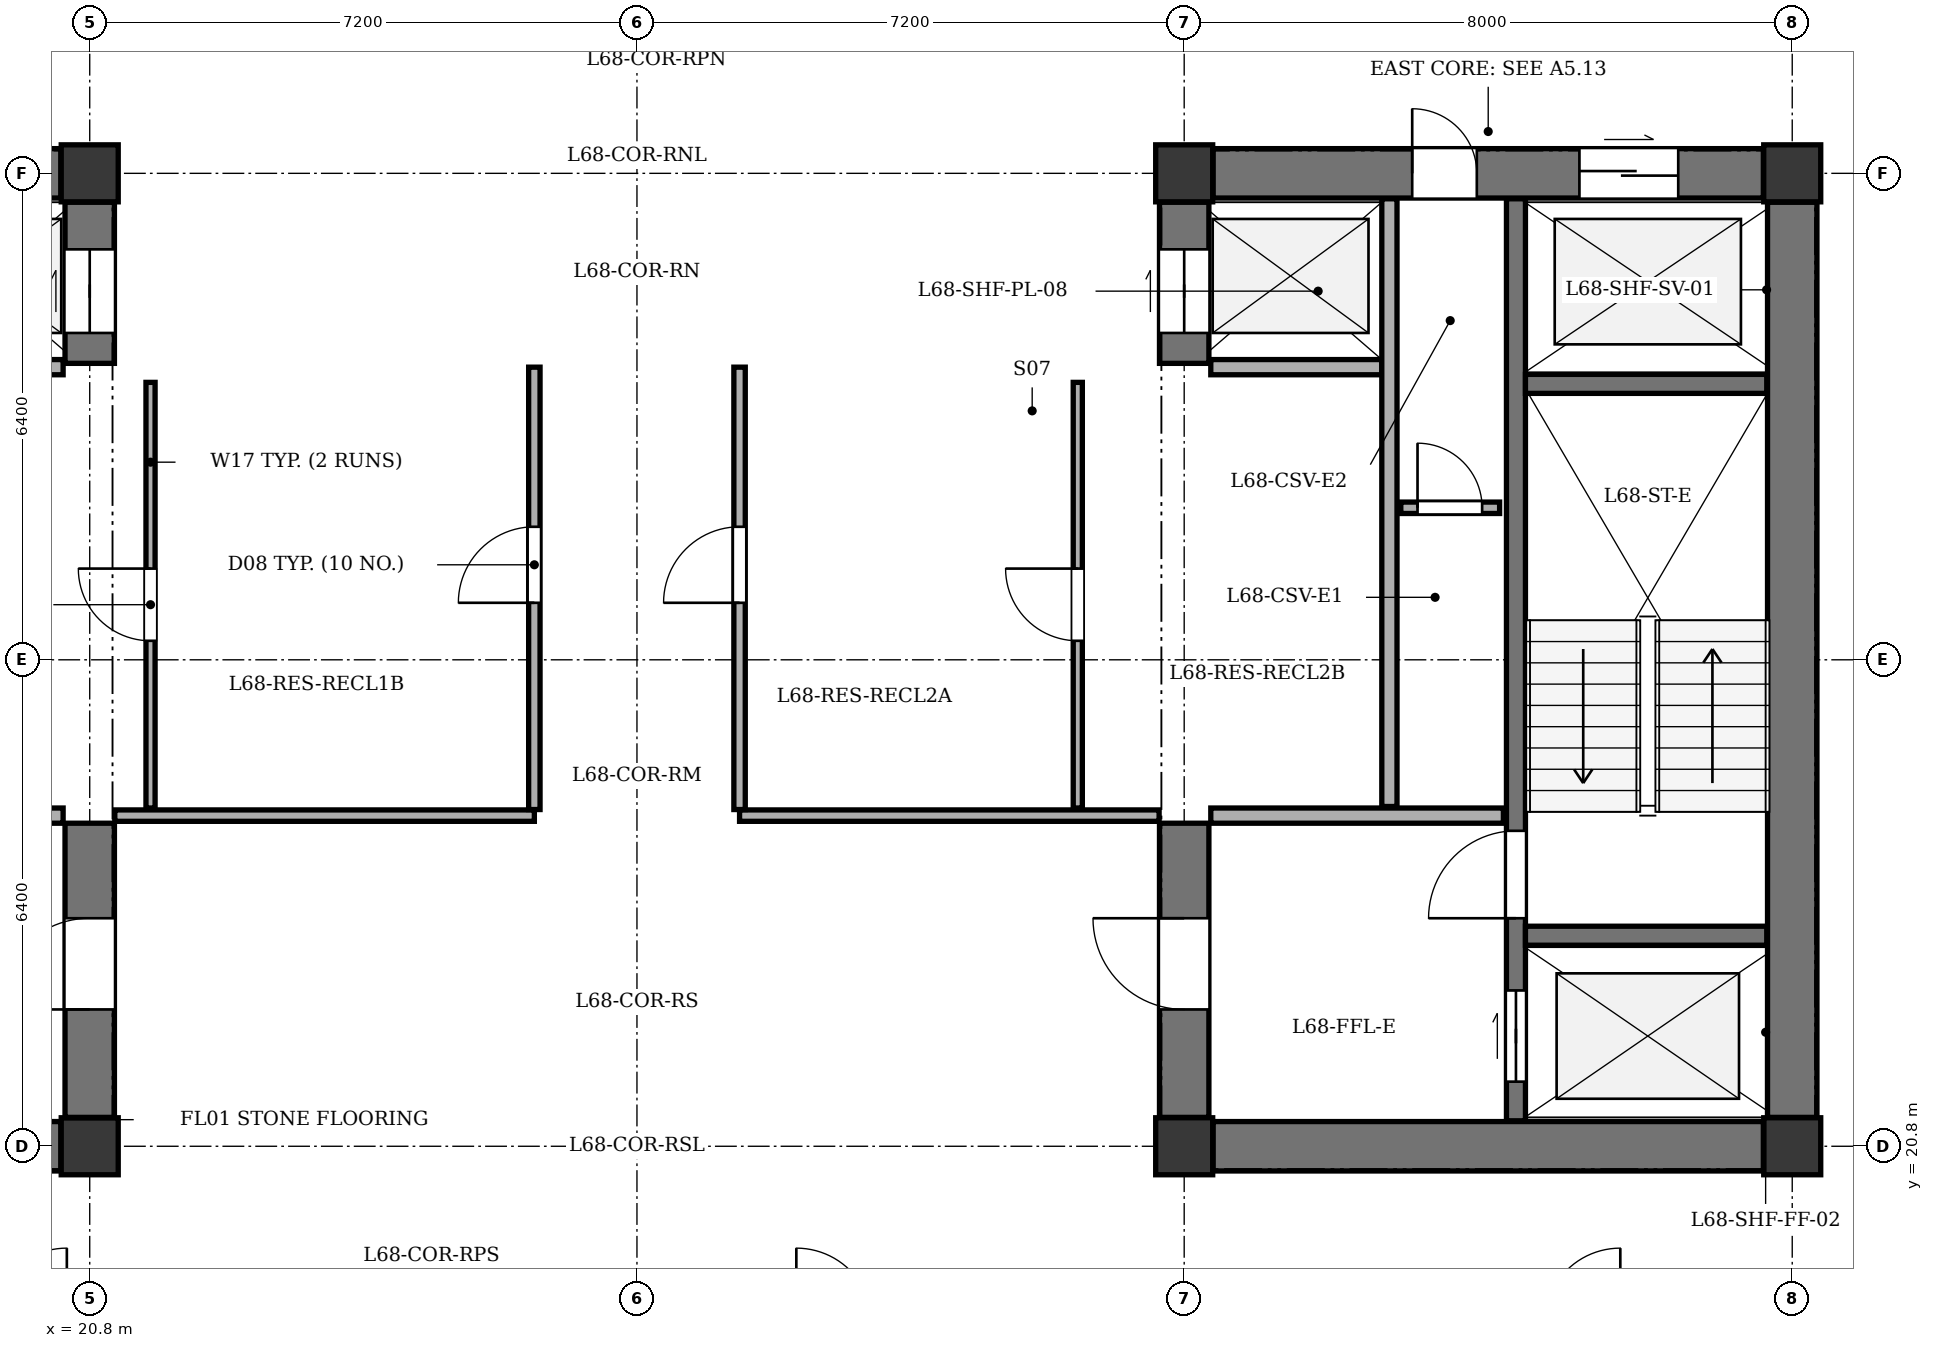
"""IFC4 building model, lengths in metres.
Left out: names, types, materials, properties, quantities, classifications, styles, units other than length and angle.
Written with IfcOpenShell. Run it as: python <this file> out.ifc"""

import sys

from ifc_helpers import new_model, si_unit, direction, frame, frame_2d, origin, origin_2d, place, context, subcontext, project, spatial, rectangle, extrude, element, fill, save


model = new_model("IFC4")
c1 = context("Model", 3, precision=1e-05, world=origin(), true_north=direction((0.0, 1.0)))
c2 = subcontext(c1, "Body", "Model", "MODEL_VIEW")
j1 = project(units=[si_unit("LENGTHUNIT", "METRE"), si_unit("PLANEANGLEUNIT", "RADIAN")], contexts=[c1])
p1 = place(None, origin())
s1 = spatial("IfcSite", under=j1, at=p1, CompositionType="ELEMENT")
p2 = place(p1, origin())
s2 = spatial("IfcBuilding", under=s1, at=p2, CompositionType="ELEMENT")
p3 = place(p2, frame((0.0, 0.0, 258.5)))
s3 = spatial("IfcBuildingStorey", under=s2, at=p3, CompositionType="ELEMENT", Elevation=258.5)
for number, where, z_axis, x_axis in (
    (1, (20.8, 20.8, 0.0), (0.0, 0.0, 1.0), (1.0, 0.0, 0.0)),
    (2, (20.8, 33.6, 0.0), (0.0, 0.0, 1.0), (1.0, 0.0, 0.0)),
    (3, (35.2, 20.8, 0.0), (0.0, 0.0, 1.0), (1.0, 0.0, 0.0)),
    (4, (43.2, 20.8, 0.0), (0.0, 0.0, 1.0), (1.0, 0.0, 0.0)),
    (5, (35.2, 33.6, 0.0), (0.0, 0.0, 1.0), (1.0, 0.0, 0.0)),
    (6, (43.2, 33.6, 0.0), (0.0, 0.0, 1.0), (1.0, 0.0, 0.0)),
):
    element("IfcColumn", number, at=place(p3, frame(where, z_axis=z_axis, x_axis=x_axis)), inside=s3, PredefinedType="COLUMN", context=c2, shape_type="SweptSolid", body=[
        extrude(rectangle(XDim=0.75, YDim=0.75, at=origin_2d()), origin(), (0.0, 0.0, 1.0), 3.4),
    ])
p4 = place(p3, frame((13.18, 20.8, 0.0), z_axis=(0.0, 0.0, 1.0), x_axis=(1.0, 0.0, 0.0)))
e7 = element("IfcWall", 7, at=p4, inside=s3, PredefinedType="SHEAR", context=c2, shape_type="SweptSolid", body=[
    extrude(rectangle(XDim=7.24, YDim=0.65, at=frame_2d((3.62, 0.0))), origin(), (0.0, 0.0, 1.0), 3.1),
])
p5 = place(p3, frame((13.18, 33.6, 0.0), z_axis=(0.0, 0.0, 1.0), x_axis=(1.0, 0.0, 0.0)))
e8 = element("IfcWall", 8, at=p5, inside=s3, PredefinedType="SHEAR", context=c2, shape_type="SweptSolid", body=[
    extrude(rectangle(XDim=7.24, YDim=0.65, at=frame_2d((3.62, 0.0))), origin(), (0.0, 0.0, 1.0), 3.1),
])
p6 = place(p5, frame((2.19, 0.0, 0.0)))
e9 = element("IfcOpeningElement", 9, at=p6, cuts=e8, PredefinedType="OPENING", context=c2, shape_type="SweptSolid", body=[
    extrude(rectangle(XDim=0.85, YDim=2.02, at=frame_2d((0.425, 1.01))), frame((0.0, 0.335, 0.0), z_axis=(0.0, -1.0, 0.0), x_axis=(1.0, 0.0, 0.0)), (0.0, 0.0, 1.0), 0.67),
])
p7 = place(p3, frame((20.8, 21.18, 0.0), z_axis=(0.0, 0.0, 1.0), x_axis=(0.0, 1.0, 0.0)))
e10 = element("IfcWall", 10, at=p7, inside=s3, PredefinedType="SHEAR", context=c2, shape_type="SweptSolid", body=[
    extrude(rectangle(XDim=3.87, YDim=0.65, at=frame_2d((1.935, 0.0))), origin(), (0.0, 0.0, 1.0), 3.1),
])
p8 = place(p7, frame((1.42, 0.0, 0.0)))
e11 = element("IfcOpeningElement", 11, at=p8, cuts=e10, PredefinedType="OPENING", context=c2, shape_type="SweptSolid", body=[
    extrude(rectangle(XDim=1.2, YDim=2.15, at=frame_2d((0.6, 1.075))), frame((0.0, 0.335, 0.0), z_axis=(0.0, -1.0, 0.0), x_axis=(1.0, 0.0, 0.0)), (0.0, 0.0, 1.0), 0.67),
])
p9 = place(p3, frame((20.8, 31.1, 0.0), z_axis=(0.0, 0.0, 1.0), x_axis=(0.0, 1.0, 0.0)))
e12 = element("IfcWall", 12, at=p9, inside=s3, PredefinedType="SHEAR", context=c2, shape_type="SweptSolid", body=[
    extrude(rectangle(XDim=2.12, YDim=0.65, at=frame_2d((1.06, 0.0))), origin(), (0.0, 0.0, 1.0), 3.1),
])
p10 = place(p9, frame((0.4, 0.0, 0.0)))
e13 = element("IfcOpeningElement", 13, at=p10, cuts=e12, PredefinedType="OPENING", context=c2, shape_type="SweptSolid", body=[
    extrude(rectangle(XDim=1.1, YDim=2.1, at=frame_2d((0.55, 1.05))), frame((0.0, 0.335, 0.0), z_axis=(0.0, -1.0, 0.0), x_axis=(1.0, 0.0, 0.0)), (0.0, 0.0, 1.0), 0.67),
])
for number, where, z_axis, x_axis in (
    (14, (16.6, 25.15, 0.0), (0.0, 0.0, 1.0), (1.0, 0.0, 0.0)),
    (15, (16.6, 31.05, 0.0), (0.0, 0.0, 1.0), (1.0, 0.0, 0.0)),
):
    element("IfcWall", number, at=place(p3, frame(where, z_axis=z_axis, x_axis=x_axis)), inside=s3, PredefinedType="SOLIDWALL", context=c2, shape_type="SweptSolid", body=[
        extrude(rectangle(XDim=3.85, YDim=0.2, at=frame_2d((1.925, 0.0))), origin(), (0.0, 0.0, 1.0), 3.1),
    ])
p11 = place(p3, frame((43.2, 21.18, 0.0), z_axis=(0.0, 0.0, 1.0), x_axis=(0.0, 1.0, 0.0)))
e16 = element("IfcWall", 16, at=p11, inside=s3, PredefinedType="SHEAR", context=c2, shape_type="SweptSolid", body=[
    extrude(rectangle(XDim=12.04, YDim=0.65, at=frame_2d((6.02, 0.0))), origin(), (0.0, 0.0, 1.0), 3.1),
])
p12 = place(p3, frame((35.58, 20.8, 0.0), z_axis=(0.0, 0.0, 1.0), x_axis=(1.0, 0.0, 0.0)))
e17 = element("IfcWall", 17, at=p12, inside=s3, PredefinedType="SHEAR", context=c2, shape_type="SweptSolid", body=[
    extrude(rectangle(XDim=7.24, YDim=0.65, at=frame_2d((3.62, 0.0))), origin(), (0.0, 0.0, 1.0), 3.1),
])
p13 = place(p3, frame((35.58, 33.6, 0.0), z_axis=(0.0, 0.0, 1.0), x_axis=(1.0, 0.0, 0.0)))
e18 = element("IfcWall", 18, at=p13, inside=s3, PredefinedType="SHEAR", context=c2, shape_type="SweptSolid", body=[
    extrude(rectangle(XDim=7.24, YDim=0.65, at=frame_2d((3.62, 0.0))), origin(), (0.0, 0.0, 1.0), 3.1),
])
p14 = place(p13, frame((4.82, 0.0, 0.0)))
e19 = element("IfcOpeningElement", 19, at=p14, cuts=e18, PredefinedType="OPENING", context=c2, shape_type="SweptSolid", body=[
    extrude(rectangle(XDim=1.3, YDim=2.15, at=frame_2d((0.65, 1.075))), frame((0.0, 0.335, 0.0), z_axis=(0.0, -1.0, 0.0), x_axis=(1.0, 0.0, 0.0)), (0.0, 0.0, 1.0), 0.67),
])
p15 = place(p13, frame((2.62, 0.0, 0.0)))
e20 = element("IfcOpeningElement", 20, at=p15, cuts=e18, PredefinedType="OPENING", context=c2, shape_type="SweptSolid", body=[
    extrude(rectangle(XDim=0.85, YDim=2.02, at=frame_2d((0.425, 1.01))), frame((0.0, 0.335, 0.0), z_axis=(0.0, -1.0, 0.0), x_axis=(1.0, 0.0, 0.0)), (0.0, 0.0, 1.0), 0.67),
])
p16 = place(p3, frame((35.2, 21.18, 0.0), z_axis=(0.0, 0.0, 1.0), x_axis=(0.0, 1.0, 0.0)))
e21 = element("IfcWall", 21, at=p16, inside=s3, PredefinedType="SHEAR", context=c2, shape_type="SweptSolid", body=[
    extrude(rectangle(XDim=3.87, YDim=0.65, at=frame_2d((1.935, 0.0))), origin(), (0.0, 0.0, 1.0), 3.1),
])
p17 = place(p16, frame((1.42, 0.0, 0.0)))
e22 = element("IfcOpeningElement", 22, at=p17, cuts=e21, PredefinedType="OPENING", context=c2, shape_type="SweptSolid", body=[
    extrude(rectangle(XDim=1.2, YDim=2.15, at=frame_2d((0.6, 1.075))), frame((0.0, 0.335, 0.0), z_axis=(0.0, -1.0, 0.0), x_axis=(1.0, 0.0, 0.0)), (0.0, 0.0, 1.0), 0.67),
])
p18 = place(p3, frame((35.2, 31.1, 0.0), z_axis=(0.0, 0.0, 1.0), x_axis=(0.0, 1.0, 0.0)))
e23 = element("IfcWall", 23, at=p18, inside=s3, PredefinedType="SHEAR", context=c2, shape_type="SweptSolid", body=[
    extrude(rectangle(XDim=2.12, YDim=0.65, at=frame_2d((1.06, 0.0))), origin(), (0.0, 0.0, 1.0), 3.1),
])
p19 = place(p18, frame((0.4, 0.0, 0.0)))
e24 = element("IfcOpeningElement", 24, at=p19, cuts=e23, PredefinedType="OPENING", context=c2, shape_type="SweptSolid", body=[
    extrude(rectangle(XDim=1.1, YDim=2.1, at=frame_2d((0.55, 1.05))), frame((0.0, 0.335, 0.0), z_axis=(0.0, -1.0, 0.0), x_axis=(1.0, 0.0, 0.0)), (0.0, 0.0, 1.0), 0.67),
])
p20 = place(p3, frame((39.565, 21.135, 0.0), z_axis=(0.0, 0.0, 1.0), x_axis=(0.0, 1.0, 0.0)))
e25 = element("IfcWall", 25, at=p20, inside=s3, PredefinedType="SHEAR", context=c2, shape_type="SweptSolid", body=[
    extrude(rectangle(XDim=12.13, YDim=0.25, at=frame_2d((6.065, 0.0))), origin(), (0.0, 0.0, 1.0), 3.1),
])
p21 = place(p20, frame((0.515, 0.0, 0.0)))
e26 = element("IfcOpeningElement", 26, at=p21, cuts=e25, PredefinedType="OPENING", context=c2, shape_type="SweptSolid", body=[
    extrude(rectangle(XDim=1.2, YDim=2.15, at=frame_2d((0.6, 1.075))), frame((0.0, 0.135, 0.0), z_axis=(0.0, -1.0, 0.0), x_axis=(1.0, 0.0, 0.0)), (0.0, 0.0, 1.0), 0.27),
])
p22 = place(p20, frame((2.665, 0.0, 0.0)))
e27 = element("IfcOpeningElement", 27, at=p22, cuts=e25, PredefinedType="OPENING", context=c2, shape_type="SweptSolid", body=[
    extrude(rectangle(XDim=1.15, YDim=2.15, at=frame_2d((0.575, 1.075))), frame((0.0, 0.135, 0.0), z_axis=(0.0, -1.0, 0.0), x_axis=(1.0, 0.0, 0.0)), (0.0, 0.0, 1.0), 0.27),
])
for number, where, z_axis, x_axis in (
    (28, (39.69, 23.57, 0.0), (0.0, 0.0, 1.0), (1.0, 0.0, 0.0)),
    (29, (39.69, 30.83, 0.0), (0.0, 0.0, 1.0), (1.0, 0.0, 0.0)),
):
    element("IfcWall", number, at=place(p3, frame(where, z_axis=z_axis, x_axis=x_axis)), inside=s3, PredefinedType="SHEAR", context=c2, shape_type="SweptSolid", body=[
        extrude(rectangle(XDim=3.175, YDim=0.25, at=frame_2d((1.587, 0.0))), origin(), (0.0, 0.0, 1.0), 3.1),
    ])
p23 = place(p3, frame((35.55, 25.15, 0.0), z_axis=(0.0, 0.0, 1.0), x_axis=(1.0, 0.0, 0.0)))
e30 = element("IfcWall", 30, at=p23, inside=s3, PredefinedType="SOLIDWALL", context=c2, shape_type="SweptSolid", body=[
    extrude(rectangle(XDim=3.85, YDim=0.2, at=frame_2d((1.925, 0.0))), origin(), (0.0, 0.0, 1.0), 3.1),
])
p24 = place(p3, frame((35.55, 31.05, 0.0), z_axis=(0.0, 0.0, 1.0), x_axis=(1.0, 0.0, 0.0)))
e31 = element("IfcWall", 31, at=p24, inside=s3, PredefinedType="SOLIDWALL", context=c2, shape_type="SweptSolid", body=[
    extrude(rectangle(XDim=2.25, YDim=0.2, at=frame_2d((1.125, 0.0))), origin(), (0.0, 0.0, 1.0), 3.1),
])
p25 = place(p3, frame((37.9, 25.27, 0.0), z_axis=(0.0, 0.0, 1.0), x_axis=(0.0, 1.0, 0.0)))
e32 = element("IfcWall", 32, at=p25, inside=s3, PredefinedType="SOLIDWALL", context=c2, shape_type="SweptSolid", body=[
    extrude(rectangle(XDim=7.995, YDim=0.2, at=frame_2d((3.998, 0.0))), origin(), (0.0, 0.0, 1.0), 3.1),
])
p26 = place(p3, frame((38.05, 29.2, 0.0), z_axis=(0.0, 0.0, 1.0), x_axis=(1.0, 0.0, 0.0)))
e33 = element("IfcWall", 33, at=p26, inside=s3, PredefinedType="PARTITIONING", context=c2, shape_type="SweptSolid", body=[
    extrude(rectangle(XDim=1.3, YDim=0.15, at=frame_2d((0.65, 0.0))), origin(), (0.0, 0.0, 1.0), 3.1),
])
p27 = place(p26, frame((0.22, 0.0, 0.0)))
e34 = element("IfcOpeningElement", 34, at=p27, cuts=e33, PredefinedType="OPENING", context=c2, shape_type="SweptSolid", body=[
    extrude(rectangle(XDim=0.85, YDim=2.02, at=frame_2d((0.425, 1.01))), frame((0.0, 0.085, 0.0), z_axis=(0.0, -1.0, 0.0), x_axis=(1.0, 0.0, 0.0)), (0.0, 0.0, 1.0), 0.17),
])
for number, where, z_axis, x_axis in (
    (35, (21.13, 25.15, 0.0), (0.0, 0.0, 1.0), (1.0, 0.0, 0.0)),
    (36, (29.35, 25.15, 0.0), (0.0, 0.0, 1.0), (1.0, 0.0, 0.0)),
):
    element("IfcWall", number, at=place(p3, frame(where, z_axis=z_axis, x_axis=x_axis)), inside=s3, PredefinedType="PARTITIONING", context=c2, shape_type="SweptSolid", body=[
        extrude(rectangle(XDim=5.52, YDim=0.15, at=frame_2d((2.76, 0.0))), origin(), (0.0, 0.0, 1.0), 3.1),
    ])
p28 = place(p3, frame((26.65, 25.23, 0.0), z_axis=(0.0, 0.0, 1.0), x_axis=(0.0, 1.0, 0.0)))
e37 = element("IfcWall", 37, at=p28, inside=s3, PredefinedType="PARTITIONING", context=c2, shape_type="SweptSolid", body=[
    extrude(rectangle(XDim=5.82, YDim=0.15, at=frame_2d((2.91, 0.0))), origin(), (0.0, 0.0, 1.0), 3.1),
])
p29 = place(p28, frame((2.72, 0.0, 0.0)))
e38 = element("IfcOpeningElement", 38, at=p29, cuts=e37, PredefinedType="OPENING", context=c2, shape_type="SweptSolid", body=[
    extrude(rectangle(XDim=1.0, YDim=2.1, at=frame_2d((0.5, 1.05))), frame((0.0, 0.085, 0.0), z_axis=(0.0, -1.0, 0.0), x_axis=(1.0, 0.0, 0.0)), (0.0, 0.0, 1.0), 0.17),
])
p30 = place(p3, frame((21.6, 25.25, 0.0), z_axis=(0.0, 0.0, 1.0), x_axis=(0.0, 1.0, 0.0)))
e39 = element("IfcWall", 39, at=p30, inside=s3, PredefinedType="PARTITIONING", context=c2, shape_type="SweptSolid", body=[
    extrude(rectangle(XDim=5.6, YDim=0.12, at=frame_2d((2.8, 0.0))), origin(), (0.0, 0.0, 1.0), 3.1),
])
p31 = place(p30, frame((2.2, 0.0, 0.0)))
e40 = element("IfcOpeningElement", 40, at=p31, cuts=e39, PredefinedType="OPENING", context=c2, shape_type="SweptSolid", body=[
    extrude(rectangle(XDim=0.95, YDim=2.1, at=frame_2d((0.475, 1.05))), frame((0.0, 0.07, 0.0), z_axis=(0.0, -1.0, 0.0), x_axis=(1.0, 0.0, 0.0)), (0.0, 0.0, 1.0), 0.14),
])
p32 = place(p3, frame((29.35, 25.23, 0.0), z_axis=(0.0, 0.0, 1.0), x_axis=(0.0, 1.0, 0.0)))
e41 = element("IfcWall", 41, at=p32, inside=s3, PredefinedType="PARTITIONING", context=c2, shape_type="SweptSolid", body=[
    extrude(rectangle(XDim=5.82, YDim=0.15, at=frame_2d((2.91, 0.0))), origin(), (0.0, 0.0, 1.0), 3.1),
])
p33 = place(p32, frame((2.72, 0.0, 0.0)))
e42 = element("IfcOpeningElement", 42, at=p33, cuts=e41, PredefinedType="OPENING", context=c2, shape_type="SweptSolid", body=[
    extrude(rectangle(XDim=1.0, YDim=2.1, at=frame_2d((0.5, 1.05))), frame((0.0, 0.085, 0.0), z_axis=(0.0, -1.0, 0.0), x_axis=(1.0, 0.0, 0.0)), (0.0, 0.0, 1.0), 0.17),
])
p34 = place(p3, frame((33.8, 25.25, 0.0), z_axis=(0.0, 0.0, 1.0), x_axis=(0.0, 1.0, 0.0)))
e43 = element("IfcWall", 43, at=p34, inside=s3, PredefinedType="PARTITIONING", context=c2, shape_type="SweptSolid", body=[
    extrude(rectangle(XDim=5.6, YDim=0.12, at=frame_2d((2.8, 0.0))), origin(), (0.0, 0.0, 1.0), 3.1),
])
p35 = place(p34, frame((2.2, 0.0, 0.0)))
e44 = element("IfcOpeningElement", 44, at=p35, cuts=e43, PredefinedType="OPENING", context=c2, shape_type="SweptSolid", body=[
    extrude(rectangle(XDim=0.95, YDim=2.1, at=frame_2d((0.475, 1.05))), frame((0.0, 0.07, 0.0), z_axis=(0.0, -1.0, 0.0), x_axis=(1.0, 0.0, 0.0)), (0.0, 0.0, 1.0), 0.14),
])
p36 = place(p8, origin())
e45 = element("IfcDoor", 45, at=p36, inside=s3, OperationType="SINGLE_SWING_LEFT", PredefinedType="DOOR", context=c2, shape_type="SweptSolid", body=[
    extrude(rectangle(XDim=1.2, YDim=2.15, at=frame_2d((0.6, 1.075))), frame((0.0, 0.025, 0.0), z_axis=(0.0, -1.0, 0.0), x_axis=(1.0, 0.0, 0.0)), (0.0, 0.0, 1.0), 0.05),
])
fill(e11, e45)
p37 = place(p10, origin())
e46 = element("IfcDoor", 46, at=p37, inside=s3, OperationType="DOUBLE_DOOR_SLIDING", PredefinedType="DOOR", context=c2, shape_type="SweptSolid", body=[
    extrude(rectangle(XDim=1.1, YDim=2.1, at=frame_2d((0.55, 1.05))), frame((0.0, 0.025, 0.0), z_axis=(0.0, -1.0, 0.0), x_axis=(1.0, 0.0, 0.0)), (0.0, 0.0, 1.0), 0.05),
])
fill(e13, e46)
p38 = place(p14, origin())
e47 = element("IfcDoor", 47, at=p38, inside=s3, OperationType="DOUBLE_DOOR_SLIDING", PredefinedType="DOOR", context=c2, shape_type="SweptSolid", body=[
    extrude(rectangle(XDim=1.3, YDim=2.15, at=frame_2d((0.65, 1.075))), frame((0.0, 0.025, 0.0), z_axis=(0.0, -1.0, 0.0), x_axis=(1.0, 0.0, 0.0)), (0.0, 0.0, 1.0), 0.05),
])
fill(e19, e47)
p39 = place(p15, origin())
e48 = element("IfcDoor", 48, at=p39, inside=s3, OperationType="SINGLE_SWING_LEFT", PredefinedType="DOOR", context=c2, shape_type="SweptSolid", body=[
    extrude(rectangle(XDim=0.85, YDim=2.02, at=frame_2d((0.425, 1.01))), frame((0.0, 0.025, 0.0), z_axis=(0.0, -1.0, 0.0), x_axis=(1.0, 0.0, 0.0)), (0.0, 0.0, 1.0), 0.05),
])
fill(e20, e48)
p40 = place(p17, origin())
e49 = element("IfcDoor", 49, at=p40, inside=s3, OperationType="SINGLE_SWING_RIGHT", PredefinedType="DOOR", context=c2, shape_type="SweptSolid", body=[
    extrude(rectangle(XDim=1.2, YDim=2.15, at=frame_2d((0.6, 1.075))), frame((0.0, 0.025, 0.0), z_axis=(0.0, -1.0, 0.0), x_axis=(1.0, 0.0, 0.0)), (0.0, 0.0, 1.0), 0.05),
])
fill(e22, e49)
p41 = place(p19, origin())
e50 = element("IfcDoor", 50, at=p41, inside=s3, OperationType="DOUBLE_DOOR_SLIDING", PredefinedType="DOOR", context=c2, shape_type="SweptSolid", body=[
    extrude(rectangle(XDim=1.1, YDim=2.1, at=frame_2d((0.55, 1.05))), frame((0.0, 0.025, 0.0), z_axis=(0.0, -1.0, 0.0), x_axis=(1.0, 0.0, 0.0)), (0.0, 0.0, 1.0), 0.05),
])
fill(e24, e50)
p42 = place(p21, origin())
e51 = element("IfcDoor", 51, at=p42, inside=s3, OperationType="DOUBLE_DOOR_SLIDING", PredefinedType="DOOR", context=c2, shape_type="SweptSolid", body=[
    extrude(rectangle(XDim=1.2, YDim=2.15, at=frame_2d((0.6, 1.075))), frame((0.0, 0.025, 0.0), z_axis=(0.0, -1.0, 0.0), x_axis=(1.0, 0.0, 0.0)), (0.0, 0.0, 1.0), 0.05),
])
fill(e26, e51)
p43 = place(p22, origin())
e52 = element("IfcDoor", 52, at=p43, inside=s3, OperationType="SINGLE_SWING_LEFT", PredefinedType="DOOR", context=c2, shape_type="SweptSolid", body=[
    extrude(rectangle(XDim=1.15, YDim=2.15, at=frame_2d((0.575, 1.075))), frame((0.0, 0.025, 0.0), z_axis=(0.0, -1.0, 0.0), x_axis=(1.0, 0.0, 0.0)), (0.0, 0.0, 1.0), 0.05),
])
fill(e27, e52)
p44 = place(p27, origin())
e53 = element("IfcDoor", 53, at=p44, inside=s3, OperationType="SINGLE_SWING_LEFT", PredefinedType="DOOR", context=c2, shape_type="SweptSolid", body=[
    extrude(rectangle(XDim=0.85, YDim=2.02, at=frame_2d((0.425, 1.01))), frame((0.0, 0.025, 0.0), z_axis=(0.0, -1.0, 0.0), x_axis=(1.0, 0.0, 0.0)), (0.0, 0.0, 1.0), 0.05),
])
fill(e34, e53)
p45 = place(p31, origin())
e54 = element("IfcDoor", 54, at=p45, inside=s3, OperationType="SINGLE_SWING_RIGHT", PredefinedType="DOOR", context=c2, shape_type="SweptSolid", body=[
    extrude(rectangle(XDim=0.95, YDim=2.1, at=frame_2d((0.475, 1.05))), frame((0.0, 0.025, 0.0), z_axis=(0.0, -1.0, 0.0), x_axis=(1.0, 0.0, 0.0)), (0.0, 0.0, 1.0), 0.05),
])
fill(e40, e54)
p46 = place(p29, origin())
e55 = element("IfcDoor", 55, at=p46, inside=s3, OperationType="SINGLE_SWING_LEFT", PredefinedType="DOOR", context=c2, shape_type="SweptSolid", body=[
    extrude(rectangle(XDim=1.0, YDim=2.1, at=frame_2d((0.5, 1.05))), frame((0.0, 0.025, 0.0), z_axis=(0.0, -1.0, 0.0), x_axis=(1.0, 0.0, 0.0)), (0.0, 0.0, 1.0), 0.05),
])
fill(e38, e55)
p47 = place(p35, origin())
e56 = element("IfcDoor", 56, at=p47, inside=s3, OperationType="SINGLE_SWING_RIGHT", PredefinedType="DOOR", context=c2, shape_type="SweptSolid", body=[
    extrude(rectangle(XDim=0.95, YDim=2.1, at=frame_2d((0.475, 1.05))), frame((0.0, 0.025, 0.0), z_axis=(0.0, -1.0, 0.0), x_axis=(1.0, 0.0, 0.0)), (0.0, 0.0, 1.0), 0.05),
])
fill(e44, e56)
p48 = place(p33, origin())
e57 = element("IfcDoor", 57, at=p48, inside=s3, OperationType="SINGLE_SWING_LEFT", PredefinedType="DOOR", context=c2, shape_type="SweptSolid", body=[
    extrude(rectangle(XDim=1.0, YDim=2.1, at=frame_2d((0.5, 1.05))), frame((0.0, 0.025, 0.0), z_axis=(0.0, -1.0, 0.0), x_axis=(1.0, 0.0, 0.0)), (0.0, 0.0, 1.0), 0.05),
])
fill(e42, e57)
save(model, sys.argv[1])
